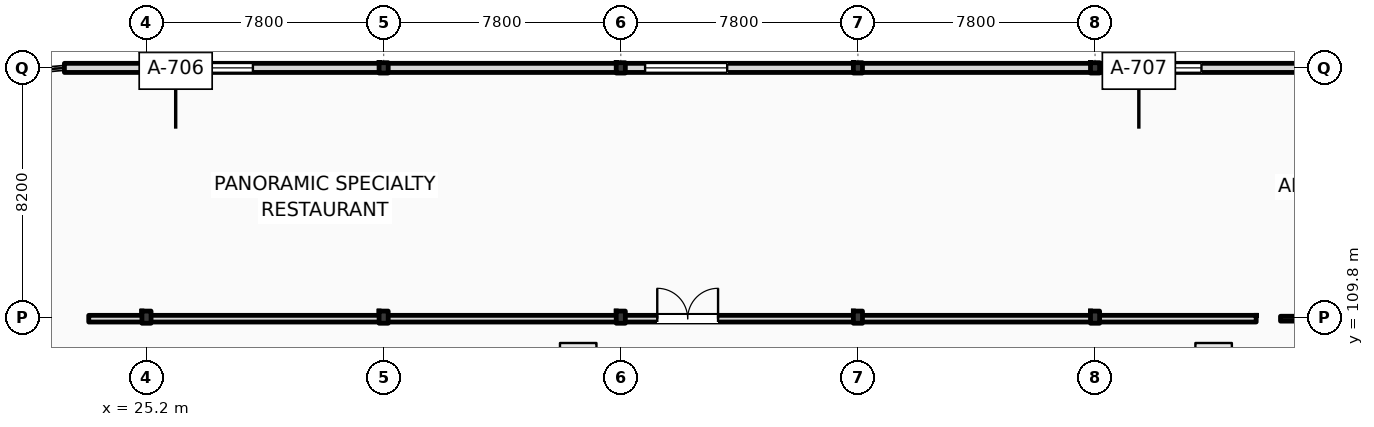
"""IFC4 building model, lengths in metres.
Left out: names, types, materials, properties, quantities, classifications, styles, units other than length and angle.
Written with IfcOpenShell. Run it as: python <this file> out.ifc"""

import sys

from ifc_helpers import new_model, si_unit, direction, frame, frame_2d, origin, origin_2d, place, context, subcontext, project, spatial, rectangle, i_section, extrude, element, fill, save


model = new_model("IFC4")
c1 = context("Model", 3, precision=1e-05, world=origin(), true_north=direction((0.0, 1.0)))
c2 = subcontext(c1, "Body", "Model", "MODEL_VIEW")
j1 = project(units=[si_unit("LENGTHUNIT", "METRE"), si_unit("PLANEANGLEUNIT", "RADIAN")], contexts=[c1])
p1 = place(None, origin())
s1 = spatial("IfcSite", under=j1, at=p1, CompositionType="ELEMENT")
p2 = place(p1, origin())
s2 = spatial("IfcBuilding", under=s1, at=p2, CompositionType="ELEMENT")
p3 = place(p2, frame((0.0, 0.0, 46.8)))
s3 = spatial("IfcBuildingStorey", under=s2, at=p3, CompositionType="ELEMENT", Elevation=46.8)
p4 = place(p3, frame((25.2, 109.8, 0.0), z_axis=(0.0, 0.0, 1.0), x_axis=(1.0, 0.0, 0.0)))
e1 = element("IfcColumn", 1, at=p4, inside=s3, PredefinedType="COLUMN", context=c2, shape_type="SweptSolid", body=[
    extrude(i_section(OverallWidth=0.3, OverallDepth=0.4, WebThickness=0.013, FlangeThickness=0.024, FilletRadius=0.027, at=origin_2d()), origin(), (0.0, 0.0, 1.0), 4.8),
])
p5 = place(p3, frame((25.2, 118.0, 0.0), z_axis=(0.0, 0.0, 1.0), x_axis=(1.0, 0.0, 0.0)))
e2 = element("IfcColumn", 2, at=p5, inside=s3, PredefinedType="COLUMN", context=c2, shape_type="SweptSolid", body=[
    extrude(i_section(OverallWidth=0.3, OverallDepth=0.34, WebThickness=0.012, FlangeThickness=0.021, FilletRadius=0.027, at=origin_2d()), origin(), (0.0, 0.0, 1.0), 4.8),
])
p6 = place(p3, frame((33.0, 109.8, 0.0), z_axis=(0.0, 0.0, 1.0), x_axis=(1.0, 0.0, 0.0)))
e3 = element("IfcColumn", 3, at=p6, inside=s3, PredefinedType="COLUMN", context=c2, shape_type="SweptSolid", body=[
    extrude(i_section(OverallWidth=0.3, OverallDepth=0.4, WebThickness=0.013, FlangeThickness=0.024, FilletRadius=0.027, at=origin_2d()), origin(), (0.0, 0.0, 1.0), 4.8),
])
p7 = place(p3, frame((33.0, 118.0, 0.0), z_axis=(0.0, 0.0, 1.0), x_axis=(1.0, 0.0, 0.0)))
e4 = element("IfcColumn", 4, at=p7, inside=s3, PredefinedType="COLUMN", context=c2, shape_type="SweptSolid", body=[
    extrude(i_section(OverallWidth=0.3, OverallDepth=0.34, WebThickness=0.012, FlangeThickness=0.021, FilletRadius=0.027, at=origin_2d()), origin(), (0.0, 0.0, 1.0), 4.8),
])
p8 = place(p3, frame((40.8, 109.8, 0.0), z_axis=(0.0, 0.0, 1.0), x_axis=(1.0, 0.0, 0.0)))
e5 = element("IfcColumn", 5, at=p8, inside=s3, PredefinedType="COLUMN", context=c2, shape_type="SweptSolid", body=[
    extrude(i_section(OverallWidth=0.3, OverallDepth=0.4, WebThickness=0.013, FlangeThickness=0.024, FilletRadius=0.027, at=origin_2d()), origin(), (0.0, 0.0, 1.0), 4.8),
])
p9 = place(p3, frame((40.8, 118.0, 0.0), z_axis=(0.0, 0.0, 1.0), x_axis=(1.0, 0.0, 0.0)))
e6 = element("IfcColumn", 6, at=p9, inside=s3, PredefinedType="COLUMN", context=c2, shape_type="SweptSolid", body=[
    extrude(i_section(OverallWidth=0.3, OverallDepth=0.34, WebThickness=0.012, FlangeThickness=0.021, FilletRadius=0.027, at=origin_2d()), origin(), (0.0, 0.0, 1.0), 4.8),
])
p10 = place(p3, frame((48.6, 109.8, 0.0), z_axis=(0.0, 0.0, 1.0), x_axis=(1.0, 0.0, 0.0)))
e7 = element("IfcColumn", 7, at=p10, inside=s3, PredefinedType="COLUMN", context=c2, shape_type="SweptSolid", body=[
    extrude(i_section(OverallWidth=0.3, OverallDepth=0.4, WebThickness=0.013, FlangeThickness=0.024, FilletRadius=0.027, at=origin_2d()), origin(), (0.0, 0.0, 1.0), 4.8),
])
p11 = place(p3, frame((48.6, 118.0, 0.0), z_axis=(0.0, 0.0, 1.0), x_axis=(1.0, 0.0, 0.0)))
e8 = element("IfcColumn", 8, at=p11, inside=s3, PredefinedType="COLUMN", context=c2, shape_type="SweptSolid", body=[
    extrude(i_section(OverallWidth=0.3, OverallDepth=0.34, WebThickness=0.012, FlangeThickness=0.021, FilletRadius=0.027, at=origin_2d()), origin(), (0.0, 0.0, 1.0), 4.8),
])
p12 = place(p3, frame((56.4, 109.8, 0.0), z_axis=(0.0, 0.0, 1.0), x_axis=(1.0, 0.0, 0.0)))
e9 = element("IfcColumn", 9, at=p12, inside=s3, PredefinedType="COLUMN", context=c2, shape_type="SweptSolid", body=[
    extrude(i_section(OverallWidth=0.3, OverallDepth=0.4, WebThickness=0.013, FlangeThickness=0.024, FilletRadius=0.027, at=origin_2d()), origin(), (0.0, 0.0, 1.0), 4.8),
])
p13 = place(p3, frame((56.4, 118.0, 0.0), z_axis=(0.0, 0.0, 1.0), x_axis=(1.0, 0.0, 0.0)))
e10 = element("IfcColumn", 10, at=p13, inside=s3, PredefinedType="COLUMN", context=c2, shape_type="SweptSolid", body=[
    extrude(i_section(OverallWidth=0.3, OverallDepth=0.34, WebThickness=0.012, FlangeThickness=0.021, FilletRadius=0.027, at=origin_2d()), origin(), (0.0, 0.0, 1.0), 4.8),
])
p14 = place(p3, frame((22.5, 118.0, 0.0), z_axis=(0.0, 0.0, 1.0), x_axis=(1.0, 0.0, 0.0)))
e11 = element("IfcWall", 11, at=p14, inside=s3, PredefinedType="STANDARD", context=c2, shape_type="SweptSolid", body=[
    extrude(rectangle(XDim=57.3, YDim=0.3, at=frame_2d((28.65, 0.0))), origin(), (0.0, 0.0, 1.0), 4.08),
])
p15 = place(p14, frame((3.5, 0.0, 0.85)))
e12 = element("IfcOpeningElement", 12, at=p15, cuts=e11, PredefinedType="OPENING", context=c2, shape_type="SweptSolid", body=[
    extrude(rectangle(XDim=2.7, YDim=2.4, at=frame_2d((1.35, 1.2))), frame((0.0, 0.16, 0.0), z_axis=(0.0, -1.0, 0.0), x_axis=(1.0, 0.0, 0.0)), (0.0, 0.0, 1.0), 0.32),
])
p16 = place(p14, frame((19.1, 0.0, 0.85)))
e13 = element("IfcOpeningElement", 13, at=p16, cuts=e11, PredefinedType="OPENING", context=c2, shape_type="SweptSolid", body=[
    extrude(rectangle(XDim=2.7, YDim=2.4, at=frame_2d((1.35, 1.2))), frame((0.0, 0.16, 0.0), z_axis=(0.0, -1.0, 0.0), x_axis=(1.0, 0.0, 0.0)), (0.0, 0.0, 1.0), 0.32),
])
p17 = place(p14, frame((34.7, 0.0, 0.85)))
e14 = element("IfcOpeningElement", 14, at=p17, cuts=e11, PredefinedType="OPENING", context=c2, shape_type="SweptSolid", body=[
    extrude(rectangle(XDim=2.7, YDim=2.4, at=frame_2d((1.35, 1.2))), frame((0.0, 0.16, 0.0), z_axis=(0.0, -1.0, 0.0), x_axis=(1.0, 0.0, 0.0)), (0.0, 0.0, 1.0), 0.32),
])
p18 = place(p14, frame((45.5, 0.0, 0.85)))
e15 = element("IfcOpeningElement", 15, at=p18, cuts=e11, PredefinedType="OPENING", context=c2, shape_type="SweptSolid", body=[
    extrude(rectangle(XDim=2.7, YDim=2.4, at=frame_2d((1.35, 1.2))), frame((0.0, 0.16, 0.0), z_axis=(0.0, -1.0, 0.0), x_axis=(1.0, 0.0, 0.0)), (0.0, 0.0, 1.0), 0.32),
])
p19 = place(p3, frame((23.3, 109.75, 0.0), z_axis=(0.0, 0.0, 1.0), x_axis=(1.0, 0.0, 0.0)))
e16 = element("IfcWall", 16, at=p19, inside=s3, PredefinedType="PARTITIONING", context=c2, shape_type="SweptSolid", body=[
    extrude(rectangle(XDim=38.4, YDim=0.22, at=frame_2d((19.2, 0.0))), origin(), (0.0, 0.0, 1.0), 3.98),
])
p20 = place(p19, frame((18.7, 0.0, 0.0)))
e17 = element("IfcOpeningElement", 17, at=p20, cuts=e16, PredefinedType="OPENING", context=c2, shape_type="SweptSolid", body=[
    extrude(rectangle(XDim=2.0, YDim=2.35, at=frame_2d((1.0, 1.175))), frame((0.0, 0.12, 0.0), z_axis=(0.0, -1.0, 0.0), x_axis=(1.0, 0.0, 0.0)), (0.0, 0.0, 1.0), 0.24),
])
p21 = place(p3, frame((62.5, 109.75, 0.0), z_axis=(0.0, 0.0, 1.0), x_axis=(1.0, 0.0, 0.0)))
e18 = element("IfcWall", 18, at=p21, inside=s3, PredefinedType="PARTITIONING", context=c2, shape_type="SweptSolid", body=[
    extrude(rectangle(XDim=16.6, YDim=0.16, at=frame_2d((8.3, 0.0))), origin(), (0.0, 0.0, 1.0), 4.08),
])
p22 = place(p21, frame((6.9, 0.0, 0.0)))
e19 = element("IfcOpeningElement", 19, at=p22, cuts=e18, PredefinedType="OPENING", context=c2, shape_type="SweptSolid", body=[
    extrude(rectangle(XDim=1.3, YDim=2.2, at=frame_2d((0.65, 1.1))), frame((0.0, 0.09, 0.0), z_axis=(0.0, -1.0, 0.0), x_axis=(1.0, 0.0, 0.0)), (0.0, 0.0, 1.0), 0.18),
])
p23 = place(p15, origin())
e20 = element("IfcWindow", 20, at=p23, inside=s3, PartitioningType="DOUBLE_PANEL_VERTICAL", PredefinedType="WINDOW", context=c2, shape_type="SweptSolid", body=[
    extrude(rectangle(XDim=2.7, YDim=2.4, at=frame_2d((1.35, 1.2))), frame((0.0, 0.03, 0.0), z_axis=(0.0, -1.0, 0.0), x_axis=(1.0, 0.0, 0.0)), (0.0, 0.0, 1.0), 0.06),
])
fill(e12, e20)
p24 = place(p16, origin())
e21 = element("IfcWindow", 21, at=p24, inside=s3, PartitioningType="DOUBLE_PANEL_VERTICAL", PredefinedType="WINDOW", context=c2, shape_type="SweptSolid", body=[
    extrude(rectangle(XDim=2.7, YDim=2.4, at=frame_2d((1.35, 1.2))), frame((0.0, 0.03, 0.0), z_axis=(0.0, -1.0, 0.0), x_axis=(1.0, 0.0, 0.0)), (0.0, 0.0, 1.0), 0.06),
])
fill(e13, e21)
p25 = place(p17, origin())
e22 = element("IfcWindow", 22, at=p25, inside=s3, PartitioningType="DOUBLE_PANEL_VERTICAL", PredefinedType="WINDOW", context=c2, shape_type="SweptSolid", body=[
    extrude(rectangle(XDim=2.7, YDim=2.4, at=frame_2d((1.35, 1.2))), frame((0.0, 0.03, 0.0), z_axis=(0.0, -1.0, 0.0), x_axis=(1.0, 0.0, 0.0)), (0.0, 0.0, 1.0), 0.06),
])
fill(e14, e22)
p26 = place(p2, frame((0.0, 0.0, 51.6)))
p27 = place(p26, frame((0.0, 0.0, -0.26)))
p28 = place(p27, frame((39.4, 108.35, -0.01)))
p29 = place(p28, frame((0.0, 0.0, 0.22)))
e23 = element("IfcWindow", 23, at=p29, inside=s3, PartitioningType="SINGLE_PANEL", PredefinedType="SKYLIGHT", context=c2, shape_type="SweptSolid", body=[
    extrude(rectangle(XDim=1.2, YDim=1.2, at=origin_2d()), origin(), (0.0, 0.0, 1.0), 0.05),
])
p30 = place(p27, frame((60.3, 108.35, -0.01)))
p31 = place(p30, frame((0.0, 0.0, 0.22)))
e24 = element("IfcWindow", 24, at=p31, inside=s3, PartitioningType="SINGLE_PANEL", PredefinedType="SKYLIGHT", context=c2, shape_type="SweptSolid", body=[
    extrude(rectangle(XDim=1.2, YDim=1.2, at=origin_2d()), origin(), (0.0, 0.0, 1.0), 0.05),
])
p32 = place(p20, origin())
e25 = element("IfcDoor", 25, at=p32, inside=s3, OperationType="DOUBLE_SWING_LEFT", PredefinedType="DOOR", context=c2, shape_type="SweptSolid", body=[
    extrude(rectangle(XDim=2.0, YDim=2.35, at=frame_2d((1.0, 1.175))), frame((0.0, 0.025, 0.0), z_axis=(0.0, -1.0, 0.0), x_axis=(1.0, 0.0, 0.0)), (0.0, 0.0, 1.0), 0.05),
])
fill(e17, e25)
save(model, sys.argv[1])
